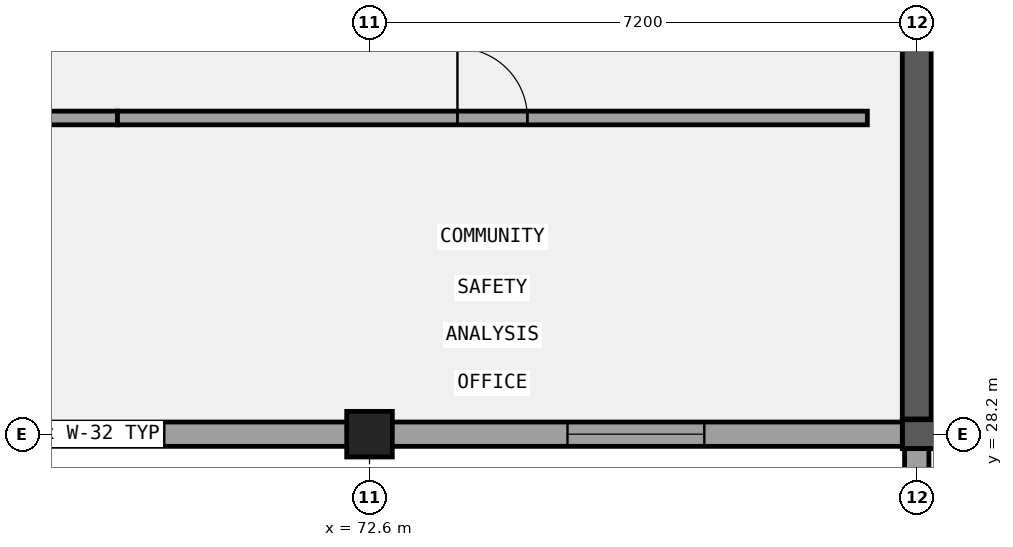
"""IFC4 building model, lengths in metres.
Left out: names, types, materials, properties, quantities, classifications, styles, units other than length and angle.
Written with IfcOpenShell. Run it as: python <this file> out.ifc"""

import sys

from ifc_helpers import new_model, si_unit, direction, frame, frame_2d, origin, origin_2d, place, context, subcontext, project, spatial, rectangle, extrude, element, fill, save


model = new_model("IFC4")
c1 = context("Model", 3, precision=1e-05, world=origin(), true_north=direction((0.0, 1.0)))
c2 = subcontext(c1, "Body", "Model", "MODEL_VIEW")
j1 = project(units=[si_unit("LENGTHUNIT", "METRE"), si_unit("PLANEANGLEUNIT", "RADIAN")], contexts=[c1])
p1 = place(None, origin())
s1 = spatial("IfcSite", under=j1, at=p1, CompositionType="ELEMENT")
p2 = place(p1, origin())
s2 = spatial("IfcBuilding", under=s1, at=p2, CompositionType="ELEMENT")
p3 = place(p2, frame((0.0, 0.0, 9.6)))
s3 = spatial("IfcBuildingStorey", under=s2, at=p3, CompositionType="ELEMENT", Elevation=9.6)
p4 = place(p3, frame((79.61, 28.2, 0.0), z_axis=(0.0, 0.0, 1.0), x_axis=(1.0, 0.0, 0.0)))
e1 = element("IfcWall", 1, at=p4, inside=s3, PredefinedType="SHEAR", context=c2, shape_type="SweptSolid", body=[
    extrude(rectangle(XDim=14.78, YDim=0.38, at=frame_2d((7.39, 0.0))), origin(), (0.0, 0.0, 1.0), 4.2),
])
p5 = place(p4, frame((3.74, 0.0, 0.0)))
e2 = element("IfcOpeningElement", 2, at=p5, cuts=e1, PredefinedType="OPENING", context=c2, shape_type="SweptSolid", body=[
    extrude(rectangle(XDim=1.3, YDim=2.2, at=frame_2d((0.65, 1.1))), frame((0.0, 0.2, 0.0), z_axis=(0.0, -1.0, 0.0), x_axis=(1.0, 0.0, 0.0)), (0.0, 0.0, 1.0), 0.4),
])
p6 = place(p3, frame((79.8, 28.4, 0.0), z_axis=(0.0, 0.0, 1.0), x_axis=(0.0, 1.0, 0.0)))
e3 = element("IfcWall", 3, at=p6, inside=s3, PredefinedType="SHEAR", context=c2, shape_type="SweptSolid", body=[
    extrude(rectangle(XDim=6.8, YDim=0.38, at=frame_2d((3.4, 0.0))), origin(), (0.0, 0.0, 1.0), 4.2),
])
p7 = place(p3, frame((80.0, 31.82, 0.0), z_axis=(0.0, 0.0, 1.0), x_axis=(1.0, 0.0, 0.0)))
e4 = element("IfcWall", 4, at=p7, inside=s3, PredefinedType="SHEAR", context=c2, shape_type="SweptSolid", body=[
    extrude(rectangle(XDim=14.0, YDim=0.38, at=frame_2d((7.0, 0.0))), origin(), (0.0, 0.0, 1.0), 4.2),
])
p8 = place(p7, frame((8.14, 0.0, 0.0)))
e5 = element("IfcOpeningElement", 5, at=p8, cuts=e4, PredefinedType="OPENING", context=c2, shape_type="SweptSolid", body=[
    extrude(rectangle(XDim=1.2, YDim=2.15, at=frame_2d((0.6, 1.075))), frame((0.0, 0.2, 0.0), z_axis=(0.0, -1.0, 0.0), x_axis=(1.0, 0.0, 0.0)), (0.0, 0.0, 1.0), 0.4),
])
p9 = place(p7, frame((0.375, 0.0, 0.0)))
e6 = element("IfcOpeningElement", 6, at=p9, cuts=e4, PredefinedType="OPENING", context=c2, shape_type="SweptSolid", body=[
    extrude(rectangle(XDim=1.15, YDim=2.15, at=frame_2d((0.575, 1.075))), frame((0.0, 0.2, 0.0), z_axis=(0.0, -1.0, 0.0), x_axis=(1.0, 0.0, 0.0)), (0.0, 0.0, 1.0), 0.4),
])
p10 = place(p3, frame((72.6, 28.2, 0.0), z_axis=(0.0, 0.0, 1.0), x_axis=(1.0, 0.0, 0.0)))
e7 = element("IfcColumn", 7, at=p10, inside=s3, PredefinedType="COLUMN", context=c2, shape_type="SweptSolid", body=[
    extrude(rectangle(XDim=0.6, YDim=0.6, at=origin_2d()), origin(), (0.0, 0.0, 1.0), 4.2),
])
p11 = place(p3, frame((79.8, 28.01, 0.0), z_axis=(0.0, 0.0, 1.0), x_axis=(0.0, -1.0, 0.0)))
e8 = element("IfcWall", 8, at=p11, inside=s3, PredefinedType="SOLIDWALL", context=c2, shape_type="SweptSolid", body=[
    extrude(rectangle(XDim=21.25, YDim=0.32, at=frame_2d((10.625, 0.0))), origin(), (0.0, 0.0, 1.0), 3.19),
])
p12 = place(p11, frame((17.005, 0.0, 1.0)))
e9 = element("IfcOpeningElement", 9, at=p12, cuts=e8, PredefinedType="OPENING", context=c2, shape_type="SweptSolid", body=[
    extrude(rectangle(XDim=1.45, YDim=1.9, at=frame_2d((0.725, 0.95))), frame((0.0, 0.17, 0.0), z_axis=(0.0, -1.0, 0.0), x_axis=(1.0, 0.0, 0.0)), (0.0, 0.0, 1.0), 0.34),
])
p13 = place(p11, frame((9.885, 0.0, 1.0)))
e10 = element("IfcOpeningElement", 10, at=p13, cuts=e8, PredefinedType="OPENING", context=c2, shape_type="SweptSolid", body=[
    extrude(rectangle(XDim=1.45, YDim=1.9, at=frame_2d((0.725, 0.95))), frame((0.0, 0.17, 0.0), z_axis=(0.0, -1.0, 0.0), x_axis=(1.0, 0.0, 0.0)), (0.0, 0.0, 1.0), 0.34),
])
p14 = place(p11, frame((2.78, 0.0, 1.0)))
e11 = element("IfcOpeningElement", 11, at=p14, cuts=e8, PredefinedType="OPENING", context=c2, shape_type="SweptSolid", body=[
    extrude(rectangle(XDim=1.45, YDim=1.9, at=frame_2d((0.725, 0.95))), frame((0.0, 0.17, 0.0), z_axis=(0.0, -1.0, 0.0), x_axis=(1.0, 0.0, 0.0)), (0.0, 0.0, 1.0), 0.34),
])
p15 = place(p3, frame((29.24, 28.2, 0.0), z_axis=(0.0, 0.0, 1.0), x_axis=(1.0, 0.0, 0.0)))
e12 = element("IfcWall", 12, at=p15, inside=s3, PredefinedType="SOLIDWALL", context=c2, shape_type="SweptSolid", body=[
    extrude(rectangle(XDim=50.37, YDim=0.32, at=frame_2d((25.185, 0.0))), origin(), (0.0, 0.0, 1.0), 2.94),
])
p16 = place(p15, frame((2.86, 0.0, 1.0)))
e13 = element("IfcOpeningElement", 13, at=p16, cuts=e12, PredefinedType="OPENING", context=c2, shape_type="SweptSolid", body=[
    extrude(rectangle(XDim=1.8, YDim=1.65, at=frame_2d((0.9, 0.825))), frame((0.0, 0.17, 0.0), z_axis=(0.0, -1.0, 0.0), x_axis=(1.0, 0.0, 0.0)), (0.0, 0.0, 1.0), 0.34),
])
p17 = place(p15, frame((10.06, 0.0, 1.0)))
e14 = element("IfcOpeningElement", 14, at=p17, cuts=e12, PredefinedType="OPENING", context=c2, shape_type="SweptSolid", body=[
    extrude(rectangle(XDim=1.8, YDim=1.65, at=frame_2d((0.9, 0.825))), frame((0.0, 0.17, 0.0), z_axis=(0.0, -1.0, 0.0), x_axis=(1.0, 0.0, 0.0)), (0.0, 0.0, 1.0), 0.34),
])
p18 = place(p15, frame((17.26, 0.0, 1.0)))
e15 = element("IfcOpeningElement", 15, at=p18, cuts=e12, PredefinedType="OPENING", context=c2, shape_type="SweptSolid", body=[
    extrude(rectangle(XDim=1.8, YDim=1.65, at=frame_2d((0.9, 0.825))), frame((0.0, 0.17, 0.0), z_axis=(0.0, -1.0, 0.0), x_axis=(1.0, 0.0, 0.0)), (0.0, 0.0, 1.0), 0.34),
])
p19 = place(p15, frame((24.46, 0.0, 1.0)))
e16 = element("IfcOpeningElement", 16, at=p19, cuts=e12, PredefinedType="OPENING", context=c2, shape_type="SweptSolid", body=[
    extrude(rectangle(XDim=1.8, YDim=1.65, at=frame_2d((0.9, 0.825))), frame((0.0, 0.17, 0.0), z_axis=(0.0, -1.0, 0.0), x_axis=(1.0, 0.0, 0.0)), (0.0, 0.0, 1.0), 0.34),
])
p20 = place(p15, frame((31.66, 0.0, 1.0)))
e17 = element("IfcOpeningElement", 17, at=p20, cuts=e12, PredefinedType="OPENING", context=c2, shape_type="SweptSolid", body=[
    extrude(rectangle(XDim=1.8, YDim=1.65, at=frame_2d((0.9, 0.825))), frame((0.0, 0.17, 0.0), z_axis=(0.0, -1.0, 0.0), x_axis=(1.0, 0.0, 0.0)), (0.0, 0.0, 1.0), 0.34),
])
p21 = place(p15, frame((38.86, 0.0, 1.0)))
e18 = element("IfcOpeningElement", 18, at=p21, cuts=e12, PredefinedType="OPENING", context=c2, shape_type="SweptSolid", body=[
    extrude(rectangle(XDim=1.8, YDim=1.65, at=frame_2d((0.9, 0.825))), frame((0.0, 0.17, 0.0), z_axis=(0.0, -1.0, 0.0), x_axis=(1.0, 0.0, 0.0)), (0.0, 0.0, 1.0), 0.34),
])
p22 = place(p15, frame((45.965, 0.0, 1.0)))
e19 = element("IfcOpeningElement", 19, at=p22, cuts=e12, PredefinedType="OPENING", context=c2, shape_type="SweptSolid", body=[
    extrude(rectangle(XDim=1.8, YDim=1.65, at=frame_2d((0.9, 0.825))), frame((0.0, 0.17, 0.0), z_axis=(0.0, -1.0, 0.0), x_axis=(1.0, 0.0, 0.0)), (0.0, 0.0, 1.0), 0.34),
])
p23 = place(p3, frame((59.418, 32.36, 0.0), z_axis=(0.0, 0.0, 1.0), x_axis=(1.0, 0.0, 0.0)))
e20 = element("IfcWall", 20, at=p23, inside=s3, PredefinedType="PARTITIONING", context=c2, shape_type="SweptSolid", body=[
    extrude(rectangle(XDim=9.866, YDim=0.18, at=frame_2d((4.933, 0.0))), origin(), (0.0, 0.0, 1.0), 3.94),
])
p24 = place(p23, frame((4.473, 0.0, 0.0)))
e21 = element("IfcOpeningElement", 21, at=p24, cuts=e20, PredefinedType="OPENING", context=c2, shape_type="SweptSolid", body=[
    extrude(rectangle(XDim=0.92, YDim=2.1, at=frame_2d((0.46, 1.05))), frame((0.0, 0.1, 0.0), z_axis=(0.0, -1.0, 0.0), x_axis=(1.0, 0.0, 0.0)), (0.0, 0.0, 1.0), 0.2),
])
p25 = place(p3, frame((69.284, 32.36, 0.0), z_axis=(0.0, 0.0, 1.0), x_axis=(1.0, 0.0, 0.0)))
e22 = element("IfcWall", 22, at=p25, inside=s3, PredefinedType="PARTITIONING", context=c2, shape_type="SweptSolid", body=[
    extrude(rectangle(XDim=9.866, YDim=0.18, at=frame_2d((4.933, 0.0))), origin(), (0.0, 0.0, 1.0), 3.94),
])
p26 = place(p25, frame((4.473, 0.0, 0.0)))
e23 = element("IfcOpeningElement", 23, at=p26, cuts=e22, PredefinedType="OPENING", context=c2, shape_type="SweptSolid", body=[
    extrude(rectangle(XDim=0.92, YDim=2.22, at=frame_2d((0.46, 1.11))), frame((0.0, 0.1, 0.0), z_axis=(0.0, -1.0, 0.0), x_axis=(1.0, 0.0, 0.0)), (0.0, 0.0, 1.0), 0.2),
])
p27 = place(p21, origin())
e24 = element("IfcWindow", 24, at=p27, inside=s3, PartitioningType="SINGLE_PANEL", PredefinedType="WINDOW", context=c2, shape_type="SweptSolid", body=[
    extrude(rectangle(XDim=1.8, YDim=1.65, at=frame_2d((0.9, 0.825))), frame((0.0, 0.03, 0.0), z_axis=(0.0, -1.0, 0.0), x_axis=(1.0, 0.0, 0.0)), (0.0, 0.0, 1.0), 0.06),
])
fill(e18, e24)
p28 = place(p22, origin())
e25 = element("IfcWindow", 25, at=p28, inside=s3, PartitioningType="SINGLE_PANEL", PredefinedType="WINDOW", context=c2, shape_type="SweptSolid", body=[
    extrude(rectangle(XDim=1.8, YDim=1.65, at=frame_2d((0.9, 0.825))), frame((0.0, 0.03, 0.0), z_axis=(0.0, -1.0, 0.0), x_axis=(1.0, 0.0, 0.0)), (0.0, 0.0, 1.0), 0.06),
])
fill(e19, e25)
p29 = place(p26, frame((0.92, 0.0, 0.0), z_axis=(0.0, 0.0, 1.0), x_axis=(-1.0, 0.0, 0.0)))
e26 = element("IfcDoor", 26, at=p29, inside=s3, OperationType="SINGLE_SWING_LEFT", PredefinedType="DOOR", context=c2, shape_type="SweptSolid", body=[
    extrude(rectangle(XDim=0.92, YDim=2.22, at=frame_2d((0.46, 1.11))), frame((0.0, 0.025, 0.0), z_axis=(0.0, -1.0, 0.0), x_axis=(1.0, 0.0, 0.0)), (0.0, 0.0, 1.0), 0.05),
])
fill(e23, e26)
save(model, sys.argv[1])
